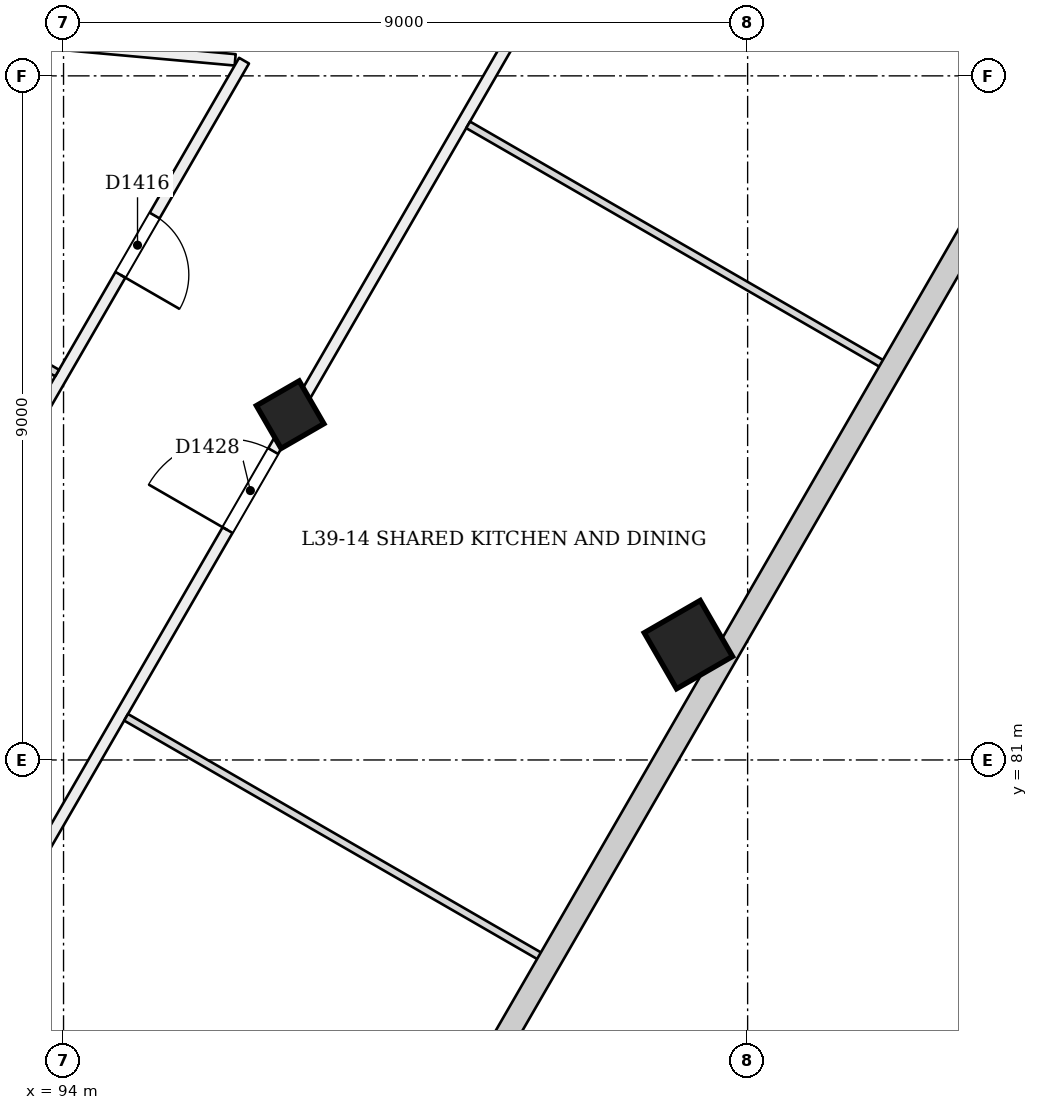
"""IFC4 building model, lengths in metres.
Left out: names, types, materials, properties, quantities, classifications, styles, units other than length and angle.
Written with IfcOpenShell. Run it as: python <this file> out.ifc"""

import sys

from ifc_helpers import new_model, si_unit, direction, frame, frame_2d, origin, origin_2d, place, context, subcontext, project, spatial, rectangle, extrude, element, fill, save


model = new_model("IFC4")
c1 = context("Model", 3, precision=1e-05, world=origin(), true_north=direction((0.0, 1.0)))
c2 = subcontext(c1, "Body", "Model", "MODEL_VIEW")
j1 = project(units=[si_unit("LENGTHUNIT", "METRE"), si_unit("PLANEANGLEUNIT", "RADIAN")], contexts=[c1])
p1 = place(None, origin())
s1 = spatial("IfcSite", under=j1, at=p1, CompositionType="ELEMENT")
p2 = place(p1, origin())
s2 = spatial("IfcBuilding", under=s1, at=p2, CompositionType="ELEMENT")
p3 = place(p2, frame((0.0, 0.0, 153.0)))
s3 = spatial("IfcBuildingStorey", under=s2, at=p3, CompositionType="ELEMENT", Elevation=153.0)
p4 = place(p3, frame((97.008, 85.495, -0.02), z_axis=(-0.022153634206, 0.038480930364, 0.999013730882), x_axis=(-0.501317549295, -0.864978512638, 0.022201068531)))
e1 = element("IfcColumn", 1, at=p4, inside=s3, PredefinedType="COLUMN", context=c2, shape_type="SweptSolid", body=[
    extrude(rectangle(XDim=0.65, YDim=0.65, at=origin_2d()), origin(), (0.0, 0.0, 1.0), 3.604),
])
p5 = place(p3, frame((102.248, 82.47, -0.026), z_axis=(-0.02222134892, 0.038480872521, 0.999012229206), x_axis=(-0.500174592943, -0.865639497158, 0.022217955235)))
e2 = element("IfcColumn", 2, at=p5, inside=s3, PredefinedType="COLUMN", context=c2, shape_type="SweptSolid", body=[
    extrude(rectangle(XDim=0.85, YDim=0.85, at=origin_2d()), origin(), (0.0, 0.0, 1.0), 3.604),
])
p6 = place(p3, frame((91.96, 90.599, 0.0), z_axis=(0.0, 0.0, 1.0), x_axis=(0.995935758561, -0.090066446696, 0.0)))
e3 = element("IfcWall", 3, at=p6, inside=s3, PredefinedType="PARTITIONING", context=c2, shape_type="SweptSolid", body=[
    extrude(rectangle(XDim=4.315, YDim=0.15, at=frame_2d((2.158, 0.0))), origin(), (0.0, 0.0, 1.0), 3.15),
])
p7 = place(p3, frame((85.065, 64.811, 0.0), z_axis=(0.0, 0.0, 1.0), x_axis=(0.500003399299, 0.866023441189, 0.0)))
e4 = element("IfcWall", 4, at=p7, inside=s3, PredefinedType="PARTITIONING", context=c2, shape_type="SweptSolid", body=[
    extrude(rectangle(XDim=37.385, YDim=0.15, at=frame_2d((18.693, 0.0))), origin(), (0.0, 0.0, 1.0), 2.75),
])
p8 = place(p7, frame((0.524, 0.0, 0.0)))
e5 = element("IfcOpeningElement", 5, at=p8, cuts=e4, PredefinedType="OPENING", context=c2, shape_type="SweptSolid", body=[
    extrude(rectangle(XDim=1.2, YDim=2.1, at=frame_2d((0.6, 1.05))), frame((0.0, 0.085, 0.0), z_axis=(0.0, -1.0, 0.0), x_axis=(1.0, 0.0, 0.0)), (0.0, 0.0, 1.0), 0.171),
])
p9 = place(p7, frame((12.036, 0.0, 0.0)))
e6 = element("IfcOpeningElement", 6, at=p9, cuts=e4, PredefinedType="OPENING", context=c2, shape_type="SweptSolid", body=[
    extrude(rectangle(XDim=1.2, YDim=2.1, at=frame_2d((0.6, 1.05))), frame((0.0, 0.085, 0.0), z_axis=(0.0, -1.0, 0.0), x_axis=(1.0, 0.0, 0.0)), (0.0, 0.0, 1.0), 0.171),
])
p10 = place(p7, frame((22.186, 0.0, 0.0)))
e7 = element("IfcOpeningElement", 7, at=p10, cuts=e4, PredefinedType="OPENING", context=c2, shape_type="SweptSolid", body=[
    extrude(rectangle(XDim=1.2, YDim=2.1, at=frame_2d((0.6, 1.05))), frame((0.0, 0.085, 0.0), z_axis=(0.0, -1.0, 0.0), x_axis=(1.0, 0.0, 0.0)), (0.0, 0.0, 1.0), 0.171),
])
p11 = place(p7, frame((31.186, 0.0, 0.0)))
e8 = element("IfcOpeningElement", 8, at=p11, cuts=e4, PredefinedType="OPENING", context=c2, shape_type="SweptSolid", body=[
    extrude(rectangle(XDim=1.2, YDim=2.1, at=frame_2d((0.6, 1.05))), frame((0.0, 0.085, 0.0), z_axis=(0.0, -1.0, 0.0), x_axis=(1.0, 0.0, 0.0)), (0.0, 0.0, 1.0), 0.171),
])
p12 = place(p3, frame((96.375, 90.2, 0.0), z_axis=(0.0, 0.0, 1.0), x_axis=(-0.499999903229, -0.866025459655, 0.0)))
e9 = element("IfcWall", 9, at=p12, inside=s3, PredefinedType="PARTITIONING", context=c2, shape_type="SweptSolid", body=[
    extrude(rectangle(XDim=22.75, YDim=0.15, at=frame_2d((11.375, 0.0))), origin(), (0.0, 0.0, 1.0), 3.15),
])
p13 = place(p12, frame((2.353, 0.0, 0.0)))
e10 = element("IfcOpeningElement", 10, at=p13, cuts=e9, PredefinedType="OPENING", context=c2, shape_type="SweptSolid", body=[
    extrude(rectangle(XDim=0.9, YDim=2.1, at=frame_2d((0.45, 1.05))), frame((0.0, 0.085, 0.0), z_axis=(0.0, -1.0, 0.0), x_axis=(1.0, 0.0, 0.0)), (0.0, 0.0, 1.0), 0.171),
])
p14 = place(p12, frame((20.831, 0.0, 0.0)))
e11 = element("IfcOpeningElement", 11, at=p14, cuts=e9, PredefinedType="OPENING", context=c2, shape_type="SweptSolid", body=[
    extrude(rectangle(XDim=0.9, YDim=2.1, at=frame_2d((0.45, 1.05))), frame((0.0, 0.085, 0.0), z_axis=(0.0, -1.0, 0.0), x_axis=(1.0, 0.0, 0.0)), (0.0, 0.0, 1.0), 0.171),
])
p15 = place(p12, frame((6.636, 0.0, 0.0)))
e12 = element("IfcOpeningElement", 12, at=p15, cuts=e9, PredefinedType="OPENING", context=c2, shape_type="SweptSolid", body=[
    extrude(rectangle(XDim=1.0, YDim=2.1, at=frame_2d((0.5, 1.05))), frame((0.0, 0.085, 0.0), z_axis=(0.0, -1.0, 0.0), x_axis=(1.0, 0.0, 0.0)), (0.0, 0.0, 1.0), 0.171),
])
p16 = place(p12, frame((13.212, 0.0, 0.0)))
e13 = element("IfcOpeningElement", 13, at=p16, cuts=e9, PredefinedType="OPENING", context=c2, shape_type="SweptSolid", body=[
    extrude(rectangle(XDim=1.0, YDim=2.1, at=frame_2d((0.5, 1.05))), frame((0.0, 0.085, 0.0), z_axis=(0.0, -1.0, 0.0), x_axis=(1.0, 0.0, 0.0)), (0.0, 0.0, 1.0), 0.171),
])
p17 = place(p3, frame((90.67, 87.964, 0.0), z_axis=(0.0, 0.0, 1.0), x_axis=(0.86603371046, -0.499985612139, 0.0)))
e14 = element("IfcWall", 14, at=p17, inside=s3, PredefinedType="PARTITIONING", context=c2, shape_type="SweptSolid", body=[
    extrude(rectangle(XDim=3.748, YDim=0.1, at=frame_2d((1.874, 0.0))), origin(), (0.0, 0.0, 1.0), 3.15),
])
for number, where, z_axis, x_axis in (
    (15, (100.3, 78.399, 0.0), (0.0, 0.0, 1.0), (-0.866, 0.5, 0.0)),
    (16, (104.8, 86.193, 0.0), (0.0, 0.0, 1.0), (-0.866, 0.5, 0.0)),
):
    element("IfcWall", number, at=place(p3, frame(where, z_axis=z_axis, x_axis=x_axis)), inside=s3, PredefinedType="PARTITIONING", context=c2, shape_type="SweptSolid", body=[
        extrude(rectangle(XDim=6.325, YDim=0.1, at=frame_2d((3.163, 0.0))), origin(), (0.0, 0.0, 1.0), 2.65),
    ])
p18 = place(p13, origin())
e17 = element("IfcDoor", 17, at=p18, inside=s3, OperationType="SINGLE_SWING_RIGHT", PredefinedType="NOTDEFINED", context=c2, shape_type="SweptSolid", body=[
    extrude(rectangle(XDim=0.9, YDim=2.1, at=frame_2d((0.45, 1.05))), frame((0.0, 0.025, 0.0), z_axis=(0.0, -1.0, 0.0), x_axis=(1.0, 0.0, 0.0)), (0.0, 0.0, 1.0), 0.05),
])
fill(e10, e17)
p19 = place(p10, origin())
e18 = element("IfcDoor", 18, at=p19, inside=s3, OperationType="SINGLE_SWING_LEFT", PredefinedType="NOTDEFINED", context=c2, shape_type="SweptSolid", body=[
    extrude(rectangle(XDim=1.2, YDim=2.1, at=frame_2d((0.6, 1.05))), frame((0.0, 0.025, 0.0), z_axis=(0.0, -1.0, 0.0), x_axis=(1.0, 0.0, 0.0)), (0.0, 0.0, 1.0), 0.05),
])
fill(e7, e18)
save(model, sys.argv[1])
